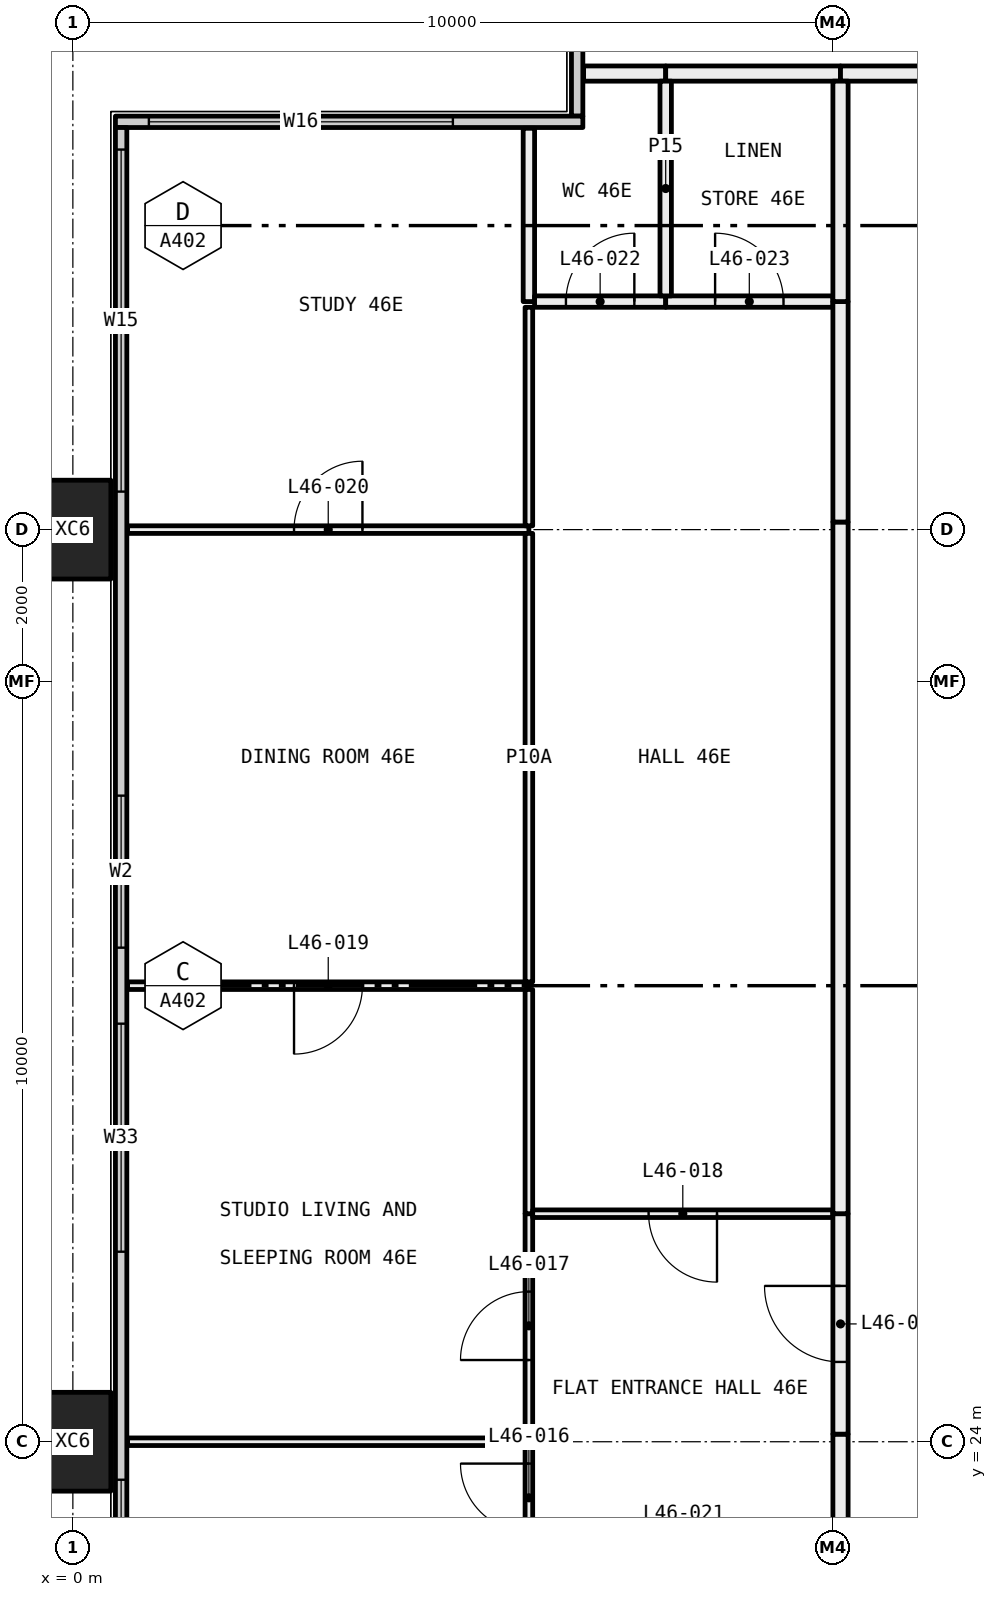
"""IFC4 building model, lengths in metres.
Left out: names, types, materials, properties, quantities, classifications, styles, units other than length and angle.
Written with IfcOpenShell. Run it as: python <this file> out.ifc"""

import sys

from ifc_helpers import new_model, si_unit, direction, frame, frame_2d, origin, origin_2d, place, context, subcontext, project, spatial, rectangle, hollow_rectangle, extrude, element, fill, save


model = new_model("IFC4")
c1 = context("Model", 3, precision=1e-05, world=origin(), true_north=direction((0.0, 1.0)))
c2 = subcontext(c1, "Body", "Model", "MODEL_VIEW")
j1 = project(units=[si_unit("LENGTHUNIT", "METRE"), si_unit("PLANEANGLEUNIT", "RADIAN")], contexts=[c1])
p1 = place(None, origin())
s1 = spatial("IfcSite", under=j1, at=p1, CompositionType="ELEMENT")
p2 = place(p1, origin())
s2 = spatial("IfcBuilding", under=s1, at=p2, CompositionType="ELEMENT")
p3 = place(p2, frame((0.0, 0.0, 175.5)))
s3 = spatial("IfcBuildingStorey", under=s2, at=p3, CompositionType="ELEMENT", Elevation=175.5)
for number, where, z_axis, x_axis in (
    (1, (0.0, 24.0, -0.4), (0.0, 0.0, 1.0), (0.0, 1.0, 0.0)),
    (2, (0.0, 36.0, -0.4), (0.0, 0.0, 1.0), (0.0, 1.0, 0.0)),
):
    element("IfcColumn", number, at=place(p3, frame(where, z_axis=z_axis, x_axis=x_axis)), inside=s3, PredefinedType="COLUMN", context=c2, shape_type="SweptSolid", body=[
        extrude(hollow_rectangle(XDim=1.3, YDim=1.0, WallThickness=0.05, at=origin_2d()), origin(), (0.0, 0.0, 1.0), 3.45),
    ])
p4 = place(p3, frame((6.635, 41.44, 0.0), z_axis=(0.0, 0.0, 1.0), x_axis=(0.0, 1.0, 0.0)))
e3 = element("IfcWall", 3, at=p4, inside=s3, PredefinedType="ELEMENTEDWALL", context=c2, shape_type="SweptSolid", body=[
    extrude(rectangle(XDim=5.85, YDim=0.15, at=frame_2d((2.925, 0.0))), origin(), (0.0, 0.0, 1.0), 3.05),
])
p5 = place(p4, frame((1.56, 0.0, 0.45)))
e4 = element("IfcOpeningElement", 4, at=p5, cuts=e3, PredefinedType="OPENING", context=c2, shape_type="SweptSolid", body=[
    extrude(rectangle(XDim=4.0, YDim=2.55, at=frame_2d((2.0, 1.275))), frame((0.0, 0.085, 0.0), z_axis=(0.0, -1.0, 0.0), x_axis=(1.0, 0.0, 0.0)), (0.0, 0.0, 1.0), 0.17),
])
p6 = place(p3, frame((0.56, 41.365, 0.0), z_axis=(0.0, 0.0, 1.0), x_axis=(1.0, 0.0, 0.0)))
e5 = element("IfcWall", 5, at=p6, inside=s3, PredefinedType="ELEMENTEDWALL", context=c2, shape_type="SweptSolid", body=[
    extrude(rectangle(XDim=6.15, YDim=0.15, at=frame_2d((3.075, 0.0))), origin(), (0.0, 0.0, 1.0), 3.05),
])
p7 = place(p6, frame((0.44, 0.0, 0.45)))
e6 = element("IfcOpeningElement", 6, at=p7, cuts=e5, PredefinedType="OPENING", context=c2, shape_type="SweptSolid", body=[
    extrude(rectangle(XDim=4.0, YDim=2.55, at=frame_2d((2.0, 1.275))), frame((0.0, 0.085, 0.0), z_axis=(0.0, -1.0, 0.0), x_axis=(1.0, 0.0, 0.0)), (0.0, 0.0, 1.0), 0.17),
])
p8 = place(p3, frame((0.635, 18.71, 0.0), z_axis=(0.0, 0.0, 1.0), x_axis=(0.0, 1.0, 0.0)))
e7 = element("IfcWall", 7, at=p8, inside=s3, PredefinedType="ELEMENTEDWALL", context=c2, shape_type="SweptSolid", body=[
    extrude(rectangle(XDim=22.58, YDim=0.15, at=frame_2d((11.29, 0.0))), origin(), (0.0, 0.0, 1.0), 3.05),
])
p9 = place(p8, frame((0.29, 0.0, 0.45)))
e8 = element("IfcOpeningElement", 8, at=p9, cuts=e7, PredefinedType="OPENING", context=c2, shape_type="SweptSolid", body=[
    extrude(rectangle(XDim=4.5, YDim=2.55, at=frame_2d((2.25, 1.275))), frame((0.0, 0.085, 0.0), z_axis=(0.0, -1.0, 0.0), x_axis=(1.0, 0.0, 0.0)), (0.0, 0.0, 1.0), 0.17),
])
p10 = place(p8, frame((7.79, 0.0, 0.45)))
e9 = element("IfcOpeningElement", 9, at=p10, cuts=e7, PredefinedType="OPENING", context=c2, shape_type="SweptSolid", body=[
    extrude(rectangle(XDim=3.0, YDim=2.55, at=frame_2d((1.5, 1.275))), frame((0.0, 0.085, 0.0), z_axis=(0.0, -1.0, 0.0), x_axis=(1.0, 0.0, 0.0)), (0.0, 0.0, 1.0), 0.17),
])
p11 = place(p8, frame((11.79, 0.0, 0.45)))
e10 = element("IfcOpeningElement", 10, at=p11, cuts=e7, PredefinedType="OPENING", context=c2, shape_type="SweptSolid", body=[
    extrude(rectangle(XDim=2.0, YDim=2.55, at=frame_2d((1.0, 1.275))), frame((0.0, 0.085, 0.0), z_axis=(0.0, -1.0, 0.0), x_axis=(1.0, 0.0, 0.0)), (0.0, 0.0, 1.0), 0.17),
])
p12 = place(p8, frame((17.79, 0.0, 0.45)))
e11 = element("IfcOpeningElement", 11, at=p12, cuts=e7, PredefinedType="OPENING", context=c2, shape_type="SweptSolid", body=[
    extrude(rectangle(XDim=4.5, YDim=2.55, at=frame_2d((2.25, 1.275))), frame((0.0, 0.085, 0.0), z_axis=(0.0, -1.0, 0.0), x_axis=(1.0, 0.0, 0.0)), (0.0, 0.0, 1.0), 0.17),
])
p13 = place(p3, frame((6.72, 42.0, 0.0), z_axis=(0.0, 0.0, 1.0), x_axis=(1.0, 0.0, 0.0)))
e12 = element("IfcWall", 12, at=p13, inside=s3, PredefinedType="PARTITIONING", context=c2, shape_type="SweptSolid", body=[
    extrude(rectangle(XDim=1.08, YDim=0.2, at=frame_2d((0.54, 0.0))), origin(), (0.0, 0.0, 1.0), 3.05),
])
p14 = place(p3, frame((7.8, 42.0, 0.0), z_axis=(0.0, 0.0, 1.0), x_axis=(1.0, 0.0, 0.0)))
e13 = element("IfcWall", 13, at=p14, inside=s3, PredefinedType="PARTITIONING", context=c2, shape_type="SweptSolid", body=[
    extrude(rectangle(XDim=2.3, YDim=0.2, at=frame_2d((1.15, 0.0))), origin(), (0.0, 0.0, 1.0), 3.05),
])
p15 = place(p3, frame((10.1, 42.0, 0.0), z_axis=(0.0, 0.0, 1.0), x_axis=(1.0, 0.0, 0.0)))
e14 = element("IfcWall", 14, at=p15, inside=s3, PredefinedType="PARTITIONING", context=c2, shape_type="SweptSolid", body=[
    extrude(rectangle(XDim=1.9, YDim=0.2, at=frame_2d((0.95, 0.0))), origin(), (0.0, 0.0, 1.0), 3.05),
])
p16 = place(p3, frame((6.0, 24.0, 0.0), z_axis=(0.0, 0.0, 1.0), x_axis=(-1.0, 0.0, 0.0)))
e15 = element("IfcWall", 15, at=p16, inside=s3, PredefinedType="PARTITIONING", context=c2, shape_type="SweptSolid", body=[
    extrude(rectangle(XDim=5.28, YDim=0.1, at=frame_2d((2.64, 0.0))), origin(), (0.0, 0.0, 1.0), 2.45),
])
p17 = place(p3, frame((6.0, 22.575, 0.0), z_axis=(0.0, 0.0, 1.0), x_axis=(0.0, 1.0, 0.0)))
e16 = element("IfcWall", 16, at=p17, inside=s3, PredefinedType="PARTITIONING", context=c2, shape_type="SweptSolid", body=[
    extrude(rectangle(XDim=1.375, YDim=0.1, at=frame_2d((0.688, 0.0))), origin(), (0.0, 0.0, 1.0), 2.45),
])
p18 = place(p17, frame((0.238, 0.0, 0.0)))
e17 = element("IfcOpeningElement", 17, at=p18, cuts=e16, PredefinedType="OPENING", context=c2, shape_type="SweptSolid", body=[
    extrude(rectangle(XDim=0.9, YDim=2.1, at=frame_2d((0.45, 1.05))), frame((0.0, 0.06, 0.0), z_axis=(0.0, -1.0, 0.0), x_axis=(1.0, 0.0, 0.0)), (0.0, 0.0, 1.0), 0.12),
])
p19 = place(p3, frame((6.0, 30.0, 0.0), z_axis=(0.0, 0.0, 1.0), x_axis=(-1.0, 0.0, 0.0)))
e18 = element("IfcWall", 18, at=p19, inside=s3, PredefinedType="PARTITIONING", context=c2, shape_type="SweptSolid", body=[
    extrude(rectangle(XDim=5.28, YDim=0.1, at=frame_2d((2.64, 0.0))), origin(), (0.0, 0.0, 1.0), 3.05),
])
p20 = place(p19, frame((2.19, 0.0, 0.0)))
e19 = element("IfcOpeningElement", 19, at=p20, cuts=e18, PredefinedType="OPENING", context=c2, shape_type="SweptSolid", body=[
    extrude(rectangle(XDim=0.9, YDim=2.1, at=frame_2d((0.45, 1.05))), frame((0.0, 0.06, 0.0), z_axis=(0.0, -1.0, 0.0), x_axis=(1.0, 0.0, 0.0)), (0.0, 0.0, 1.0), 0.12),
])
p21 = place(p3, frame((6.0, 24.05, 0.0), z_axis=(0.0, 0.0, 1.0), x_axis=(0.0, 1.0, 0.0)))
e20 = element("IfcWall", 20, at=p21, inside=s3, PredefinedType="PARTITIONING", context=c2, shape_type="SweptSolid", body=[
    extrude(rectangle(XDim=2.95, YDim=0.1, at=frame_2d((1.475, 0.0))), origin(), (0.0, 0.0, 1.0), 2.45),
])
p22 = place(p21, frame((1.025, 0.0, 0.0)))
e21 = element("IfcOpeningElement", 21, at=p22, cuts=e20, PredefinedType="OPENING", context=c2, shape_type="SweptSolid", body=[
    extrude(rectangle(XDim=0.9, YDim=2.1, at=frame_2d((0.45, 1.05))), frame((0.0, 0.06, 0.0), z_axis=(0.0, -1.0, 0.0), x_axis=(1.0, 0.0, 0.0)), (0.0, 0.0, 1.0), 0.12),
])
p23 = place(p3, frame((6.0, 27.0, 0.0), z_axis=(0.0, 0.0, 1.0), x_axis=(0.0, 1.0, 0.0)))
e22 = element("IfcWall", 22, at=p23, inside=s3, PredefinedType="PARTITIONING", context=c2, shape_type="SweptSolid", body=[
    extrude(rectangle(XDim=2.95, YDim=0.1, at=frame_2d((1.475, 0.0))), origin(), (0.0, 0.0, 1.0), 3.05),
])
p24 = place(p3, frame((6.0, 36.0, 0.0), z_axis=(0.0, 0.0, 1.0), x_axis=(-1.0, 0.0, 0.0)))
e23 = element("IfcWall", 23, at=p24, inside=s3, PredefinedType="PARTITIONING", context=c2, shape_type="SweptSolid", body=[
    extrude(rectangle(XDim=5.28, YDim=0.1, at=frame_2d((2.64, 0.0))), origin(), (0.0, 0.0, 1.0), 2.45),
])
p25 = place(p24, frame((2.19, 0.0, 0.0)))
e24 = element("IfcOpeningElement", 24, at=p25, cuts=e23, PredefinedType="OPENING", context=c2, shape_type="SweptSolid", body=[
    extrude(rectangle(XDim=0.9, YDim=2.1, at=frame_2d((0.45, 1.05))), frame((0.0, 0.06, 0.0), z_axis=(0.0, -1.0, 0.0), x_axis=(1.0, 0.0, 0.0)), (0.0, 0.0, 1.0), 0.12),
])
p26 = place(p3, frame((6.0, 30.05, 0.0), z_axis=(0.0, 0.0, 1.0), x_axis=(0.0, 1.0, 0.0)))
e25 = element("IfcWall", 25, at=p26, inside=s3, PredefinedType="PARTITIONING", context=c2, shape_type="SweptSolid", body=[
    extrude(rectangle(XDim=5.9, YDim=0.1, at=frame_2d((2.95, 0.0))), origin(), (0.0, 0.0, 1.0), 2.45),
])
p27 = place(p3, frame((6.0, 36.05, 0.0), z_axis=(0.0, 0.0, 1.0), x_axis=(0.0, 1.0, 0.0)))
e26 = element("IfcWall", 26, at=p27, inside=s3, PredefinedType="PARTITIONING", context=c2, shape_type="SweptSolid", body=[
    extrude(rectangle(XDim=2.875, YDim=0.1, at=frame_2d((1.438, 0.0))), origin(), (0.0, 0.0, 1.0), 2.45),
])
p28 = place(p3, frame((6.0, 39.0, 0.0), z_axis=(0.0, 0.0, 1.0), x_axis=(0.0, 1.0, 0.0)))
e27 = element("IfcWall", 27, at=p28, inside=s3, PredefinedType="PARTITIONING", context=c2, shape_type="SweptSolid", body=[
    extrude(rectangle(XDim=2.28, YDim=0.15, at=frame_2d((1.14, 0.0))), origin(), (0.0, 0.0, 1.0), 3.05),
])
p29 = place(p3, frame((10.0, 27.0, 0.0), z_axis=(0.0, 0.0, 1.0), x_axis=(-1.0, 0.0, 0.0)))
e28 = element("IfcWall", 28, at=p29, inside=s3, PredefinedType="PARTITIONING", context=c2, shape_type="SweptSolid", body=[
    extrude(rectangle(XDim=3.95, YDim=0.1, at=frame_2d((1.975, 0.0))), origin(), (0.0, 0.0, 1.0), 3.05),
])
p30 = place(p29, frame((1.525, 0.0, 0.0)))
e29 = element("IfcOpeningElement", 29, at=p30, cuts=e28, PredefinedType="OPENING", context=c2, shape_type="SweptSolid", body=[
    extrude(rectangle(XDim=0.9, YDim=2.1, at=frame_2d((0.45, 1.05))), frame((0.0, 0.06, 0.0), z_axis=(0.0, -1.0, 0.0), x_axis=(1.0, 0.0, 0.0)), (0.0, 0.0, 1.0), 0.12),
])
p31 = place(p3, frame((10.1, 22.5, 0.0), z_axis=(0.0, 0.0, 1.0), x_axis=(0.0, 1.0, 0.0)))
e30 = element("IfcWall", 30, at=p31, inside=s3, PredefinedType="PARTITIONING", context=c2, shape_type="SweptSolid", body=[
    extrude(rectangle(XDim=1.6, YDim=0.2, at=frame_2d((0.8, 0.0))), origin(), (0.0, 0.0, 1.0), 2.45),
])
p32 = place(p3, frame((10.1, 24.1, 0.0), z_axis=(0.0, 0.0, 1.0), x_axis=(0.0, 1.0, 0.0)))
e31 = element("IfcWall", 31, at=p32, inside=s3, PredefinedType="PARTITIONING", context=c2, shape_type="SweptSolid", body=[
    extrude(rectangle(XDim=2.9, YDim=0.2, at=frame_2d((1.45, 0.0))), origin(), (0.0, 0.0, 1.0), 3.05),
])
p33 = place(p32, frame((0.95, 0.0, 0.0)))
e32 = element("IfcOpeningElement", 32, at=p33, cuts=e31, PredefinedType="OPENING", context=c2, shape_type="SweptSolid", body=[
    extrude(rectangle(XDim=1.0, YDim=2.1, at=frame_2d((0.5, 1.05))), frame((0.0, 0.11, 0.0), z_axis=(0.0, -1.0, 0.0), x_axis=(1.0, 0.0, 0.0)), (0.0, 0.0, 1.0), 0.22),
])
p34 = place(p3, frame((7.8, 39.0, 0.0), z_axis=(0.0, 0.0, 1.0), x_axis=(-1.0, 0.0, 0.0)))
e33 = element("IfcWall", 33, at=p34, inside=s3, PredefinedType="PARTITIONING", context=c2, shape_type="SweptSolid", body=[
    extrude(rectangle(XDim=1.725, YDim=0.15, at=frame_2d((0.863, 0.0))), origin(), (0.0, 0.0, 1.0), 3.05),
])
p35 = place(p34, frame((0.413, 0.0, 0.0)))
e34 = element("IfcOpeningElement", 34, at=p35, cuts=e33, PredefinedType="OPENING", context=c2, shape_type="SweptSolid", body=[
    extrude(rectangle(XDim=0.9, YDim=2.1, at=frame_2d((0.45, 1.05))), frame((0.0, 0.085, 0.0), z_axis=(0.0, -1.0, 0.0), x_axis=(1.0, 0.0, 0.0)), (0.0, 0.0, 1.0), 0.17),
])
p36 = place(p3, frame((10.0, 39.0, 0.0), z_axis=(0.0, 0.0, 1.0), x_axis=(-1.0, 0.0, 0.0)))
e35 = element("IfcWall", 35, at=p36, inside=s3, PredefinedType="PARTITIONING", context=c2, shape_type="SweptSolid", body=[
    extrude(rectangle(XDim=2.2, YDim=0.15, at=frame_2d((1.1, 0.0))), origin(), (0.0, 0.0, 1.0), 3.05),
])
p37 = place(p36, frame((0.65, 0.0, 0.0)))
e36 = element("IfcOpeningElement", 36, at=p37, cuts=e35, PredefinedType="OPENING", context=c2, shape_type="SweptSolid", body=[
    extrude(rectangle(XDim=0.9, YDim=2.1, at=frame_2d((0.45, 1.05))), frame((0.0, 0.085, 0.0), z_axis=(0.0, -1.0, 0.0), x_axis=(1.0, 0.0, 0.0)), (0.0, 0.0, 1.0), 0.17),
])
p38 = place(p3, frame((10.1, 27.0, 0.0), z_axis=(0.0, 0.0, 1.0), x_axis=(0.0, 1.0, 0.0)))
e37 = element("IfcWall", 37, at=p38, inside=s3, PredefinedType="PARTITIONING", context=c2, shape_type="SweptSolid", body=[
    extrude(rectangle(XDim=9.1, YDim=0.2, at=frame_2d((4.55, 0.0))), origin(), (0.0, 0.0, 1.0), 2.45),
])
p39 = place(p3, frame((10.1, 36.1, 0.0), z_axis=(0.0, 0.0, 1.0), x_axis=(0.0, 1.0, 0.0)))
e38 = element("IfcWall", 38, at=p39, inside=s3, PredefinedType="PARTITIONING", context=c2, shape_type="SweptSolid", body=[
    extrude(rectangle(XDim=2.9, YDim=0.2, at=frame_2d((1.45, 0.0))), origin(), (0.0, 0.0, 1.0), 3.05),
])
p40 = place(p3, frame((7.8, 39.075, 0.0), z_axis=(0.0, 0.0, 1.0), x_axis=(0.0, 1.0, 0.0)))
e39 = element("IfcWall", 39, at=p40, inside=s3, PredefinedType="PARTITIONING", context=c2, shape_type="SweptSolid", body=[
    extrude(rectangle(XDim=2.825, YDim=0.15, at=frame_2d((1.413, 0.0))), origin(), (0.0, 0.0, 1.0), 3.05),
])
p41 = place(p3, frame((10.1, 39.0, 0.0), z_axis=(0.0, 0.0, 1.0), x_axis=(0.0, 1.0, 0.0)))
e40 = element("IfcWall", 40, at=p41, inside=s3, PredefinedType="PARTITIONING", context=c2, shape_type="SweptSolid", body=[
    extrude(rectangle(XDim=2.9, YDim=0.2, at=frame_2d((1.45, 0.0))), origin(), (0.0, 0.0, 1.0), 3.05),
])
p42 = place(p7, origin())
e41 = element("IfcWindow", 41, at=p42, inside=s3, PartitioningType="SINGLE_PANEL", PredefinedType="WINDOW", context=c2, shape_type="SweptSolid", body=[
    extrude(rectangle(XDim=4.0, YDim=2.55, at=frame_2d((2.0, 1.275))), frame((0.0, 0.03, 0.0), z_axis=(0.0, -1.0, 0.0), x_axis=(1.0, 0.0, 0.0)), (0.0, 0.0, 1.0), 0.06),
])
fill(e6, e41)
p43 = place(p9, origin())
e42 = element("IfcWindow", 42, at=p43, inside=s3, PartitioningType="SINGLE_PANEL", PredefinedType="WINDOW", context=c2, shape_type="SweptSolid", body=[
    extrude(rectangle(XDim=4.5, YDim=2.55, at=frame_2d((2.25, 1.275))), frame((0.0, 0.03, 0.0), z_axis=(0.0, -1.0, 0.0), x_axis=(1.0, 0.0, 0.0)), (0.0, 0.0, 1.0), 0.06),
])
fill(e8, e42)
p44 = place(p10, origin())
e43 = element("IfcWindow", 43, at=p44, inside=s3, PartitioningType="SINGLE_PANEL", PredefinedType="WINDOW", context=c2, shape_type="SweptSolid", body=[
    extrude(rectangle(XDim=3.0, YDim=2.55, at=frame_2d((1.5, 1.275))), frame((0.0, 0.03, 0.0), z_axis=(0.0, -1.0, 0.0), x_axis=(1.0, 0.0, 0.0)), (0.0, 0.0, 1.0), 0.06),
])
fill(e9, e43)
p45 = place(p11, origin())
e44 = element("IfcWindow", 44, at=p45, inside=s3, PartitioningType="SINGLE_PANEL", PredefinedType="WINDOW", context=c2, shape_type="SweptSolid", body=[
    extrude(rectangle(XDim=2.0, YDim=2.55, at=frame_2d((1.0, 1.275))), frame((0.0, 0.03, 0.0), z_axis=(0.0, -1.0, 0.0), x_axis=(1.0, 0.0, 0.0)), (0.0, 0.0, 1.0), 0.06),
])
fill(e10, e44)
p46 = place(p12, origin())
e45 = element("IfcWindow", 45, at=p46, inside=s3, PartitioningType="SINGLE_PANEL", PredefinedType="WINDOW", context=c2, shape_type="SweptSolid", body=[
    extrude(rectangle(XDim=4.5, YDim=2.55, at=frame_2d((2.25, 1.275))), frame((0.0, 0.03, 0.0), z_axis=(0.0, -1.0, 0.0), x_axis=(1.0, 0.0, 0.0)), (0.0, 0.0, 1.0), 0.06),
])
fill(e11, e45)
p47 = place(p33, origin())
e46 = element("IfcDoor", 46, at=p47, inside=s3, OperationType="SINGLE_SWING_LEFT", PredefinedType="DOOR", context=c2, shape_type="SweptSolid", body=[
    extrude(rectangle(XDim=1.0, YDim=2.1, at=frame_2d((0.5, 1.05))), frame((0.0, 0.025, 0.0), z_axis=(0.0, -1.0, 0.0), x_axis=(1.0, 0.0, 0.0)), (0.0, 0.0, 1.0), 0.05),
])
fill(e32, e46)
p48 = place(p18, origin())
e47 = element("IfcDoor", 47, at=p48, inside=s3, OperationType="SINGLE_SWING_LEFT", PredefinedType="DOOR", context=c2, shape_type="SweptSolid", body=[
    extrude(rectangle(XDim=0.9, YDim=2.1, at=frame_2d((0.45, 1.05))), frame((0.0, 0.025, 0.0), z_axis=(0.0, -1.0, 0.0), x_axis=(1.0, 0.0, 0.0)), (0.0, 0.0, 1.0), 0.05),
])
fill(e17, e47)
p49 = place(p22, origin())
e48 = element("IfcDoor", 48, at=p49, inside=s3, OperationType="SINGLE_SWING_RIGHT", PredefinedType="DOOR", context=c2, shape_type="SweptSolid", body=[
    extrude(rectangle(XDim=0.9, YDim=2.1, at=frame_2d((0.45, 1.05))), frame((0.0, 0.025, 0.0), z_axis=(0.0, -1.0, 0.0), x_axis=(1.0, 0.0, 0.0)), (0.0, 0.0, 1.0), 0.05),
])
fill(e21, e48)
p50 = place(p30, origin())
e49 = element("IfcDoor", 49, at=p50, inside=s3, OperationType="SINGLE_SWING_RIGHT", PredefinedType="DOOR", context=c2, shape_type="SweptSolid", body=[
    extrude(rectangle(XDim=0.9, YDim=2.1, at=frame_2d((0.45, 1.05))), frame((0.0, 0.025, 0.0), z_axis=(0.0, -1.0, 0.0), x_axis=(1.0, 0.0, 0.0)), (0.0, 0.0, 1.0), 0.05),
])
fill(e29, e49)
p51 = place(p20, origin())
e50 = element("IfcDoor", 50, at=p51, inside=s3, OperationType="SINGLE_SWING_LEFT", PredefinedType="DOOR", context=c2, shape_type="SweptSolid", body=[
    extrude(rectangle(XDim=0.9, YDim=2.1, at=frame_2d((0.45, 1.05))), frame((0.0, 0.025, 0.0), z_axis=(0.0, -1.0, 0.0), x_axis=(1.0, 0.0, 0.0)), (0.0, 0.0, 1.0), 0.05),
])
fill(e19, e50)
p52 = place(p25, frame((0.9, 0.0, 0.0), x_axis=(-1.0, 0.0, 0.0)))
e51 = element("IfcDoor", 51, at=p52, inside=s3, OperationType="SINGLE_SWING_LEFT", PredefinedType="DOOR", context=c2, shape_type="SweptSolid", body=[
    extrude(rectangle(XDim=0.9, YDim=2.1, at=frame_2d((0.45, 1.05))), frame((0.0, 0.025, 0.0), z_axis=(0.0, -1.0, 0.0), x_axis=(1.0, 0.0, 0.0)), (0.0, 0.0, 1.0), 0.05),
])
fill(e24, e51)
p53 = place(p35, frame((0.9, 0.0, 0.0), x_axis=(-1.0, 0.0, 0.0)))
e52 = element("IfcDoor", 52, at=p53, inside=s3, OperationType="SINGLE_SWING_LEFT", PredefinedType="DOOR", context=c2, shape_type="SweptSolid", body=[
    extrude(rectangle(XDim=0.9, YDim=2.1, at=frame_2d((0.45, 1.05))), frame((0.0, 0.025, 0.0), z_axis=(0.0, -1.0, 0.0), x_axis=(1.0, 0.0, 0.0)), (0.0, 0.0, 1.0), 0.05),
])
fill(e34, e52)
p54 = place(p37, frame((0.9, 0.0, 0.0), x_axis=(-1.0, 0.0, 0.0)))
e53 = element("IfcDoor", 53, at=p54, inside=s3, OperationType="SINGLE_SWING_RIGHT", PredefinedType="DOOR", context=c2, shape_type="SweptSolid", body=[
    extrude(rectangle(XDim=0.9, YDim=2.1, at=frame_2d((0.45, 1.05))), frame((0.0, 0.025, 0.0), z_axis=(0.0, -1.0, 0.0), x_axis=(1.0, 0.0, 0.0)), (0.0, 0.0, 1.0), 0.05),
])
fill(e36, e53)
save(model, sys.argv[1])
